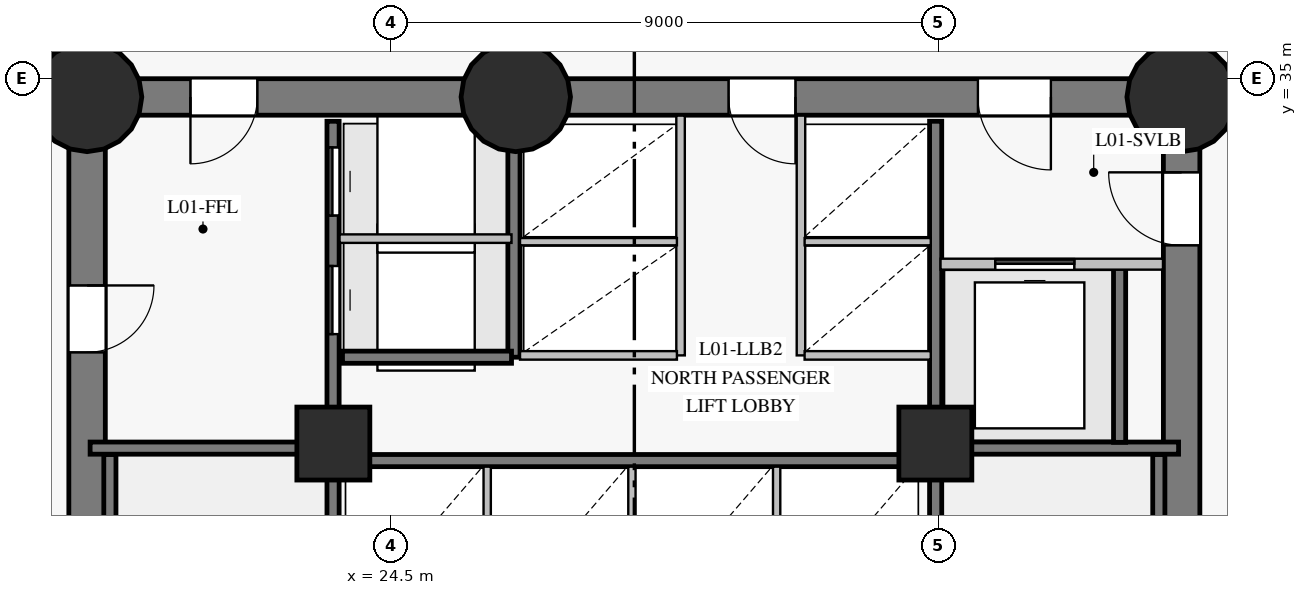
"""IFC4 building model, lengths in metres.
Left out: names, types, materials, properties, quantities, classifications, styles, units other than length and angle.
Written with IfcOpenShell. Run it as: python <this file> out.ifc"""

import sys

from ifc_helpers import new_model, si_unit, direction, frame, frame_2d, origin, origin_with_axes, origin_2d, place, context, subcontext, project, spatial, rectangle, circle, extrude, source, transform, mapped, element, fill, save


model = new_model("IFC4")
c1 = context("Model", 3, precision=1e-05, world=origin(), true_north=direction((0.0, 1.0)))
c2 = subcontext(c1, "Body", "Model", "MODEL_VIEW")
j1 = project(units=[si_unit("LENGTHUNIT", "METRE"), si_unit("PLANEANGLEUNIT", "RADIAN")], contexts=[c1])
p1 = place(None, origin())
s1 = spatial("IfcSite", under=j1, at=p1, CompositionType="ELEMENT")
p2 = place(p1, origin())
s2 = spatial("IfcBuilding", under=s1, at=p2, CompositionType="ELEMENT")
p3 = place(p2, frame((0.0, 0.0, 4.5)))
s3 = spatial("IfcBuildingStorey", under=s2, at=p3, CompositionType="ELEMENT", Elevation=4.5)
p4 = place(p3, frame((37.5, 18.3, 0.0), z_axis=(0.0, 0.0, 1.0), x_axis=(0.0, 1.0, 0.0)))
e1 = element("IfcWall", 1, at=p4, inside=s3, PredefinedType="SHEAR", context=c2, shape_type="SweptSolid", body=[
    extrude(rectangle(XDim=16.4, YDim=0.6, at=frame_2d((8.2, 0.0))), origin(), (0.0, 0.0, 1.0), 4.2),
])
p5 = place(p4, frame((13.96, 0.0, 0.0)))
e2 = element("IfcOpeningElement", 2, at=p5, cuts=e1, PredefinedType="OPENING", context=c2, shape_type="SweptSolid", body=[
    extrude(rectangle(XDim=1.2, YDim=2.15, at=frame_2d((0.6, 1.075))), frame((0.0, 0.31, 0.0), z_axis=(0.0, -1.0, 0.0), x_axis=(1.0, 0.0, 0.0)), (0.0, 0.0, 1.0), 0.62),
])
p6 = place(p3, frame((37.5, 34.7, 0.0), z_axis=(0.0, 0.0, 1.0), x_axis=(-1.0, 0.0, 0.0)))
e3 = element("IfcWall", 3, at=p6, inside=s3, PredefinedType="SHEAR", context=c2, shape_type="SweptSolid", body=[
    extrude(rectangle(XDim=10.95, YDim=0.6, at=frame_2d((5.475, 0.0))), origin(), (0.0, 0.0, 1.0), 4.2),
])
p7 = place(p6, frame((2.15, 0.0, 0.0)))
e4 = element("IfcOpeningElement", 4, at=p7, cuts=e3, PredefinedType="OPENING", context=c2, shape_type="SweptSolid", body=[
    extrude(rectangle(XDim=1.2, YDim=2.15, at=frame_2d((0.6, 1.075))), frame((0.0, 0.31, 0.0), z_axis=(0.0, -1.0, 0.0), x_axis=(1.0, 0.0, 0.0)), (0.0, 0.0, 1.0), 0.62),
])
p8 = place(p6, frame((6.35, 0.0, 0.0)))
e5 = element("IfcOpeningElement", 5, at=p8, cuts=e3, PredefinedType="OPENING", context=c2, shape_type="SweptSolid", body=[
    extrude(rectangle(XDim=1.1, YDim=2.15, at=frame_2d((0.55, 1.075))), frame((0.0, 0.31, 0.0), z_axis=(0.0, -1.0, 0.0), x_axis=(1.0, 0.0, 0.0)), (0.0, 0.0, 1.0), 0.62),
])
p9 = place(p3, frame((26.55, 34.7, 0.0), z_axis=(0.0, 0.0, 1.0), x_axis=(-1.0, 0.0, 0.0)))
e6 = element("IfcWall", 6, at=p9, inside=s3, PredefinedType="SHEAR", context=c2, shape_type="SweptSolid", body=[
    extrude(rectangle(XDim=7.05, YDim=0.6, at=frame_2d((3.525, 0.0))), origin(), (0.0, 0.0, 1.0), 4.2),
])
p10 = place(p9, frame((4.25, 0.0, 0.0)))
e7 = element("IfcOpeningElement", 7, at=p10, cuts=e6, PredefinedType="OPENING", context=c2, shape_type="SweptSolid", body=[
    extrude(rectangle(XDim=1.1, YDim=2.15, at=frame_2d((0.55, 1.075))), frame((0.0, 0.31, 0.0), z_axis=(0.0, -1.0, 0.0), x_axis=(1.0, 0.0, 0.0)), (0.0, 0.0, 1.0), 0.62),
])
p11 = place(p3, frame((19.5, 34.7, 0.0), z_axis=(0.0, 0.0, 1.0), x_axis=(0.0, -1.0, 0.0)))
e8 = element("IfcWall", 8, at=p11, inside=s3, PredefinedType="SHEAR", context=c2, shape_type="SweptSolid", body=[
    extrude(rectangle(XDim=16.4, YDim=0.6, at=frame_2d((8.2, 0.0))), origin(), (0.0, 0.0, 1.0), 4.2),
])
p12 = place(p11, frame((3.1, 0.0, 0.0)))
e9 = element("IfcOpeningElement", 9, at=p12, cuts=e8, PredefinedType="OPENING", context=c2, shape_type="SweptSolid", body=[
    extrude(rectangle(XDim=1.1, YDim=2.15, at=frame_2d((0.55, 1.075))), frame((0.0, 0.31, 0.0), z_axis=(0.0, -1.0, 0.0), x_axis=(1.0, 0.0, 0.0)), (0.0, 0.0, 1.0), 0.62),
])
m1 = source(origin_with_axes(), c2, "Body", "SweptSolid", [
    extrude(circle(Radius=0.9, at=origin_2d()), origin(), (0.0, 0.0, 1.0), 4.5),
])
for number, where, z_axis, x_axis in (
    (10, (19.5, 34.7, 0.0), (0.0, 0.0, 1.0), (1.0, 0.0, 0.0)),
    (11, (26.55, 34.7, 0.0), (0.0, 0.0, 1.0), (1.0, 0.0, 0.0)),
    (12, (37.5, 34.7, 0.0), (0.0, 0.0, 1.0), (1.0, 0.0, 0.0)),
):
    element("IfcColumn", number, at=place(p3, frame(where, z_axis=z_axis, x_axis=x_axis)), inside=s3, PredefinedType="COLUMN", context=c2, shape_type="MappedRepresentation", body=[
        mapped(m1, transform((0.0, 0.0, 0.0), scale=1.0)),
    ])
m2 = source(origin_with_axes(), c2, "Body", "SweptSolid", [
    extrude(rectangle(XDim=1.2, YDim=1.2, at=origin_2d()), origin(), (0.0, 0.0, 1.0), 4.5),
])
for number, where, z_axis, x_axis in (
    (13, (23.55, 29.0, 0.0), (0.0, 0.0, 1.0), (1.0, 0.0, 0.0)),
    (14, (33.45, 29.0, 0.0), (0.0, 0.0, 1.0), (1.0, 0.0, 0.0)),
):
    element("IfcColumn", number, at=place(p3, frame(where, z_axis=z_axis, x_axis=x_axis)), inside=s3, PredefinedType="COLUMN", context=c2, shape_type="MappedRepresentation", body=[
        mapped(m2, transform((0.0, 0.0, 0.0), scale=1.0)),
    ])
p13 = place(p3, frame((23.545, 18.7, 0.0), z_axis=(0.0, 0.0, 1.0), x_axis=(0.0, 1.0, 0.0)))
e15 = element("IfcWall", 15, at=p13, inside=s3, PredefinedType="SHEAR", context=c2, shape_type="SweptSolid", body=[
    extrude(rectangle(XDim=15.6, YDim=0.2, at=frame_2d((7.8, 0.0))), origin(), (0.0, 0.0, 1.0), 4.2),
])
p14 = place(p13, frame((2.75, 0.0, 0.0)))
e16 = element("IfcOpeningElement", 16, at=p14, cuts=e15, PredefinedType="OPENING", context=c2, shape_type="SweptSolid", body=[
    extrude(rectangle(XDim=1.15, YDim=2.15, at=frame_2d((0.575, 1.075))), frame((0.0, 0.11, 0.0), z_axis=(0.0, -1.0, 0.0), x_axis=(1.0, 0.0, 0.0)), (0.0, 0.0, 1.0), 0.22),
])
p15 = place(p13, frame((0.14, 0.0, 0.0)))
e17 = element("IfcOpeningElement", 17, at=p15, cuts=e15, PredefinedType="OPENING", context=c2, shape_type="SweptSolid", body=[
    extrude(rectangle(XDim=0.88, YDim=2.1, at=frame_2d((0.44, 1.05))), frame((0.0, 0.11, 0.0), z_axis=(0.0, -1.0, 0.0), x_axis=(1.0, 0.0, 0.0)), (0.0, 0.0, 1.0), 0.22),
])
p16 = place(p13, frame((1.36, 0.0, 0.0)))
e18 = element("IfcOpeningElement", 18, at=p16, cuts=e15, PredefinedType="OPENING", context=c2, shape_type="SweptSolid", body=[
    extrude(rectangle(XDim=0.88, YDim=2.1, at=frame_2d((0.44, 1.05))), frame((0.0, 0.11, 0.0), z_axis=(0.0, -1.0, 0.0), x_axis=(1.0, 0.0, 0.0)), (0.0, 0.0, 1.0), 0.22),
])
p17 = place(p13, frame((12.1, 0.0, 0.0)))
e19 = element("IfcOpeningElement", 19, at=p17, cuts=e15, PredefinedType="OPENING", context=c2, shape_type="SweptSolid", body=[
    extrude(rectangle(XDim=1.12, YDim=2.15, at=frame_2d((0.56, 1.075))), frame((0.0, 0.11, 0.0), z_axis=(0.0, -1.0, 0.0), x_axis=(1.0, 0.0, 0.0)), (0.0, 0.0, 1.0), 0.22),
])
p18 = place(p13, frame((14.05, 0.0, 0.0)))
e20 = element("IfcOpeningElement", 20, at=p18, cuts=e15, PredefinedType="OPENING", context=c2, shape_type="SweptSolid", body=[
    extrude(rectangle(XDim=1.12, YDim=2.15, at=frame_2d((0.56, 1.075))), frame((0.0, 0.11, 0.0), z_axis=(0.0, -1.0, 0.0), x_axis=(1.0, 0.0, 0.0)), (0.0, 0.0, 1.0), 0.22),
])
p19 = place(p3, frame((33.455, 18.7, 0.0), z_axis=(0.0, 0.0, 1.0), x_axis=(0.0, 1.0, 0.0)))
e21 = element("IfcWall", 21, at=p19, inside=s3, PredefinedType="SHEAR", context=c2, shape_type="SweptSolid", body=[
    extrude(rectangle(XDim=15.6, YDim=0.2, at=frame_2d((7.8, 0.0))), origin(), (0.0, 0.0, 1.0), 4.2),
])
p20 = place(p19, frame((2.75, 0.0, 0.0)))
e22 = element("IfcOpeningElement", 22, at=p20, cuts=e21, PredefinedType="OPENING", context=c2, shape_type="SweptSolid", body=[
    extrude(rectangle(XDim=1.15, YDim=2.15, at=frame_2d((0.575, 1.075))), frame((0.0, 0.11, 0.0), z_axis=(0.0, -1.0, 0.0), x_axis=(1.0, 0.0, 0.0)), (0.0, 0.0, 1.0), 0.22),
])
p21 = place(p19, frame((0.55, 0.0, 0.0)))
e23 = element("IfcOpeningElement", 23, at=p21, cuts=e21, PredefinedType="OPENING", context=c2, shape_type="SweptSolid", body=[
    extrude(rectangle(XDim=0.94, YDim=2.1, at=frame_2d((0.47, 1.05))), frame((0.0, 0.11, 0.0), z_axis=(0.0, -1.0, 0.0), x_axis=(1.0, 0.0, 0.0)), (0.0, 0.0, 1.0), 0.22),
])
p22 = place(p3, frame((23.7, 28.72, 0.0), z_axis=(0.0, 0.0, 1.0), x_axis=(1.0, 0.0, 0.0)))
e24 = element("IfcWall", 24, at=p22, inside=s3, PredefinedType="SHEAR", context=c2, shape_type="SweptSolid", body=[
    extrude(rectangle(XDim=9.6, YDim=0.2, at=frame_2d((4.8, 0.0))), origin(), (0.0, 0.0, 1.0), 4.2),
])
for number, where, z_axis, x_axis in (
    (25, (19.875, 21.32, 0.0), (0.0, 0.0, 1.0), (0.0, 1.0, 0.0)),
    (26, (37.125, 21.32, 0.0), (0.0, 0.0, 1.0), (0.0, 1.0, 0.0)),
):
    element("IfcWall", number, at=place(p3, frame(where, z_axis=z_axis, x_axis=x_axis)), inside=s3, PredefinedType="SHEAR", context=c2, shape_type="SweptSolid", body=[
        extrude(rectangle(XDim=7.5, YDim=0.2, at=frame_2d((3.75, 0.0))), origin(), (0.0, 0.0, 1.0), 4.2),
    ])
for number, where, z_axis, x_axis in (
    (27, (33.455, 28.925, 0.0), (0.0, 0.0, 1.0), (1.0, 0.0, 0.0)),
    (28, (19.55, 28.925, 0.0), (0.0, 0.0, 1.0), (1.0, 0.0, 0.0)),
):
    element("IfcWall", number, at=place(p3, frame(where, z_axis=z_axis, x_axis=x_axis)), inside=s3, PredefinedType="SHEAR", context=c2, shape_type="SweptSolid", body=[
        extrude(rectangle(XDim=3.995, YDim=0.2, at=frame_2d((1.998, 0.0))), origin(), (0.0, 0.0, 1.0), 4.2),
    ])
p23 = place(p3, frame((26.52, 30.42, 0.0), z_axis=(0.0, 0.0, 1.0), x_axis=(0.0, 1.0, 0.0)))
e29 = element("IfcWall", 29, at=p23, inside=s3, PredefinedType="SHEAR", context=c2, shape_type="SweptSolid", body=[
    extrude(rectangle(XDim=3.86, YDim=0.2, at=frame_2d((1.93, 0.0))), origin(), (0.0, 0.0, 1.0), 4.2),
])
p24 = place(p3, frame((36.48, 29.02, 0.0), z_axis=(0.0, 0.0, 1.0), x_axis=(0.0, 1.0, 0.0)))
e30 = element("IfcWall", 30, at=p24, inside=s3, PredefinedType="SHEAR", context=c2, shape_type="SweptSolid", body=[
    extrude(rectangle(XDim=2.86, YDim=0.2, at=frame_2d((1.43, 0.0))), origin(), (0.0, 0.0, 1.0), 4.2),
])
p25 = place(p3, frame((23.7, 30.42, 0.0), z_axis=(0.0, 0.0, 1.0), x_axis=(1.0, 0.0, 0.0)))
e31 = element("IfcWall", 31, at=p25, inside=s3, PredefinedType="SHEAR", context=c2, shape_type="SweptSolid", body=[
    extrude(rectangle(XDim=2.78, YDim=0.2, at=frame_2d((1.39, 0.0))), origin(), (0.0, 0.0, 1.0), 4.2),
])
for number, where, z_axis, x_axis in (
    (32, (29.26, 30.45, 0.0), (0.0, 0.0, 1.0), (0.0, 1.0, 0.0)),
    (33, (31.24, 30.45, 0.0), (0.0, 0.0, 1.0), (0.0, 1.0, 0.0)),
):
    element("IfcWall", number, at=place(p3, frame(where, z_axis=z_axis, x_axis=x_axis)), inside=s3, PredefinedType="PARTITIONING", context=c2, shape_type="SweptSolid", body=[
        extrude(rectangle(XDim=3.943, YDim=0.14, at=frame_2d((1.972, 0.0))), origin(), (0.0, 0.0, 1.0), 4.2),
    ])
p26 = place(p3, frame((33.535, 31.95, 0.0), z_axis=(0.0, 0.0, 1.0), x_axis=(1.0, 0.0, 0.0)))
e34 = element("IfcWall", 34, at=p26, inside=s3, PredefinedType="PARTITIONING", context=c2, shape_type="SweptSolid", body=[
    extrude(rectangle(XDim=3.658, YDim=0.18, at=frame_2d((1.829, 0.0))), origin(), (0.0, 0.0, 1.0), 4.2),
])
p27 = place(p26, frame((0.9, 0.0, 0.0)))
e35 = element("IfcOpeningElement", 35, at=p27, cuts=e34, PredefinedType="OPENING", context=c2, shape_type="SweptSolid", body=[
    extrude(rectangle(XDim=1.3, YDim=2.2, at=frame_2d((0.65, 1.1))), frame((0.0, 0.1, 0.0), z_axis=(0.0, -1.0, 0.0), x_axis=(1.0, 0.0, 0.0)), (0.0, 0.0, 1.0), 0.2),
])
p28 = place(p3, frame((23.652, 32.37, 0.0), z_axis=(0.0, 0.0, 1.0), x_axis=(1.0, 0.0, 0.0)))
e36 = element("IfcWall", 36, at=p28, inside=s3, PredefinedType="PARTITIONING", context=c2, shape_type="SweptSolid", body=[
    extrude(rectangle(XDim=2.828, YDim=0.14, at=frame_2d((1.414, 0.0))), origin(), (0.0, 0.0, 1.0), 4.2),
])
for number, where, z_axis, x_axis in (
    (37, (26.08, 26.02, 0.0), (0.0, 0.0, 1.0), (0.0, 1.0, 0.0)),
    (38, (28.46, 26.02, 0.0), (0.0, 0.0, 1.0), (0.0, 1.0, 0.0)),
    (39, (30.84, 26.02, 0.0), (0.0, 0.0, 1.0), (0.0, 1.0, 0.0)),
):
    element("IfcWall", number, at=place(p3, frame(where, z_axis=z_axis, x_axis=x_axis)), inside=s3, PredefinedType="PARTITIONING", context=c2, shape_type="SweptSolid", body=[
        extrude(rectangle(XDim=2.6, YDim=0.12, at=frame_2d((1.3, 0.0))), origin(), (0.0, 0.0, 1.0), 4.2),
    ])
p29 = place(p3, frame((26.62, 30.45, 0.0), z_axis=(0.0, 0.0, 1.0), x_axis=(1.0, 0.0, 0.0)))
e40 = element("IfcWall", 40, at=p29, inside=s3, PredefinedType="PARTITIONING", context=c2, shape_type="SweptSolid", body=[
    extrude(rectangle(XDim=2.58, YDim=0.14, at=frame_2d((1.29, 0.0))), origin(), (0.0, 0.0, 1.0), 4.2),
])
p30 = place(p3, frame((26.62, 32.32, 0.0), z_axis=(0.0, 0.0, 1.0), x_axis=(1.0, 0.0, 0.0)))
e41 = element("IfcWall", 41, at=p30, inside=s3, PredefinedType="PARTITIONING", context=c2, shape_type="SweptSolid", body=[
    extrude(rectangle(XDim=2.58, YDim=0.12, at=frame_2d((1.29, 0.0))), origin(), (0.0, 0.0, 1.0), 4.2),
])
p31 = place(p3, frame((31.3, 30.45, 0.0), z_axis=(0.0, 0.0, 1.0), x_axis=(1.0, 0.0, 0.0)))
e42 = element("IfcWall", 42, at=p31, inside=s3, PredefinedType="PARTITIONING", context=c2, shape_type="SweptSolid", body=[
    extrude(rectangle(XDim=2.075, YDim=0.14, at=frame_2d((1.038, 0.0))), origin(), (0.0, 0.0, 1.0), 4.2),
])
p32 = place(p3, frame((31.3, 32.32, 0.0), z_axis=(0.0, 0.0, 1.0), x_axis=(1.0, 0.0, 0.0)))
e43 = element("IfcWall", 43, at=p32, inside=s3, PredefinedType="PARTITIONING", context=c2, shape_type="SweptSolid", body=[
    extrude(rectangle(XDim=2.075, YDim=0.12, at=frame_2d((1.038, 0.0))), origin(), (0.0, 0.0, 1.0), 4.2),
])
m3 = source(origin_with_axes(), c2, "Body", "SweptSolid", [
    extrude(rectangle(XDim=1.1, YDim=2.15, at=frame_2d((0.55, 1.075))), frame((0.0, 0.025, 0.0), z_axis=(0.0, -1.0, 0.0), x_axis=(1.0, 0.0, 0.0)), (0.0, 0.0, 1.0), 0.05),
])
p33 = place(p10, origin())
e44 = element("IfcDoor", 44, at=p33, inside=s3, OperationType="SINGLE_SWING_RIGHT", PredefinedType="DOOR", context=c2, shape_type="MappedRepresentation", body=[
    mapped(m3, transform((0.0, 0.0, 0.0), scale=1.0)),
])
fill(e7, e44)
p34 = place(p12, origin())
e45 = element("IfcDoor", 45, at=p34, inside=s3, OperationType="SINGLE_SWING_LEFT", PredefinedType="DOOR", context=c2, shape_type="MappedRepresentation", body=[
    mapped(m3, transform((0.0, 0.0, 0.0), scale=1.0)),
])
fill(e9, e45)
m4 = source(origin_with_axes(), c2, "Body", "SweptSolid", [
    extrude(rectangle(XDim=1.2, YDim=2.15, at=frame_2d((0.6, 1.075))), frame((0.0, 0.025, 0.0), z_axis=(0.0, -1.0, 0.0), x_axis=(1.0, 0.0, 0.0)), (0.0, 0.0, 1.0), 0.05),
])
p35 = place(p5, origin())
e46 = element("IfcDoor", 46, at=p35, inside=s3, OperationType="SINGLE_SWING_RIGHT", PredefinedType="DOOR", context=c2, shape_type="MappedRepresentation", body=[
    mapped(m4, transform((0.0, 0.0, 0.0), scale=1.0)),
])
fill(e2, e46)
p36 = place(p7, origin())
e47 = element("IfcDoor", 47, at=p36, inside=s3, OperationType="SINGLE_SWING_LEFT", PredefinedType="DOOR", context=c2, shape_type="MappedRepresentation", body=[
    mapped(m4, transform((0.0, 0.0, 0.0), scale=1.0)),
])
fill(e4, e47)
m5 = source(origin_with_axes(), c2, "Body", "SweptSolid", [
    extrude(rectangle(XDim=1.3, YDim=2.2, at=frame_2d((0.65, 1.1))), frame((0.0, 0.025, 0.0), z_axis=(0.0, -1.0, 0.0), x_axis=(1.0, 0.0, 0.0)), (0.0, 0.0, 1.0), 0.05),
])
p37 = place(p27, origin())
e48 = element("IfcDoor", 48, at=p37, inside=s3, OperationType="SLIDING_TO_LEFT", PredefinedType="DOOR", context=c2, shape_type="MappedRepresentation", body=[
    mapped(m5, transform((0.0, 0.0, 0.0), scale=1.0)),
])
fill(e35, e48)
p38 = place(p8, origin())
e49 = element("IfcDoor", 49, at=p38, inside=s3, OperationType="SINGLE_SWING_LEFT", PredefinedType="DOOR", context=c2, shape_type="MappedRepresentation", body=[
    mapped(m3, transform((0.0, 0.0, 0.0), scale=1.0)),
])
fill(e5, e49)
m6 = source(origin_with_axes(), c2, "Body", "SweptSolid", [
    extrude(rectangle(XDim=1.12, YDim=2.15, at=frame_2d((0.56, 1.075))), frame((0.0, 0.025, 0.0), z_axis=(0.0, -1.0, 0.0), x_axis=(1.0, 0.0, 0.0)), (0.0, 0.0, 1.0), 0.05),
])
p39 = place(p17, origin())
e50 = element("IfcDoor", 50, at=p39, inside=s3, OperationType="SLIDING_TO_LEFT", PredefinedType="DOOR", context=c2, shape_type="MappedRepresentation", body=[
    mapped(m6, transform((0.0, 0.0, 0.0), scale=1.0)),
])
fill(e19, e50)
p40 = place(p18, origin())
e51 = element("IfcDoor", 51, at=p40, inside=s3, OperationType="SLIDING_TO_RIGHT", PredefinedType="DOOR", context=c2, shape_type="MappedRepresentation", body=[
    mapped(m6, transform((0.0, 0.0, 0.0), scale=1.0)),
])
fill(e20, e51)
save(model, sys.argv[1])
